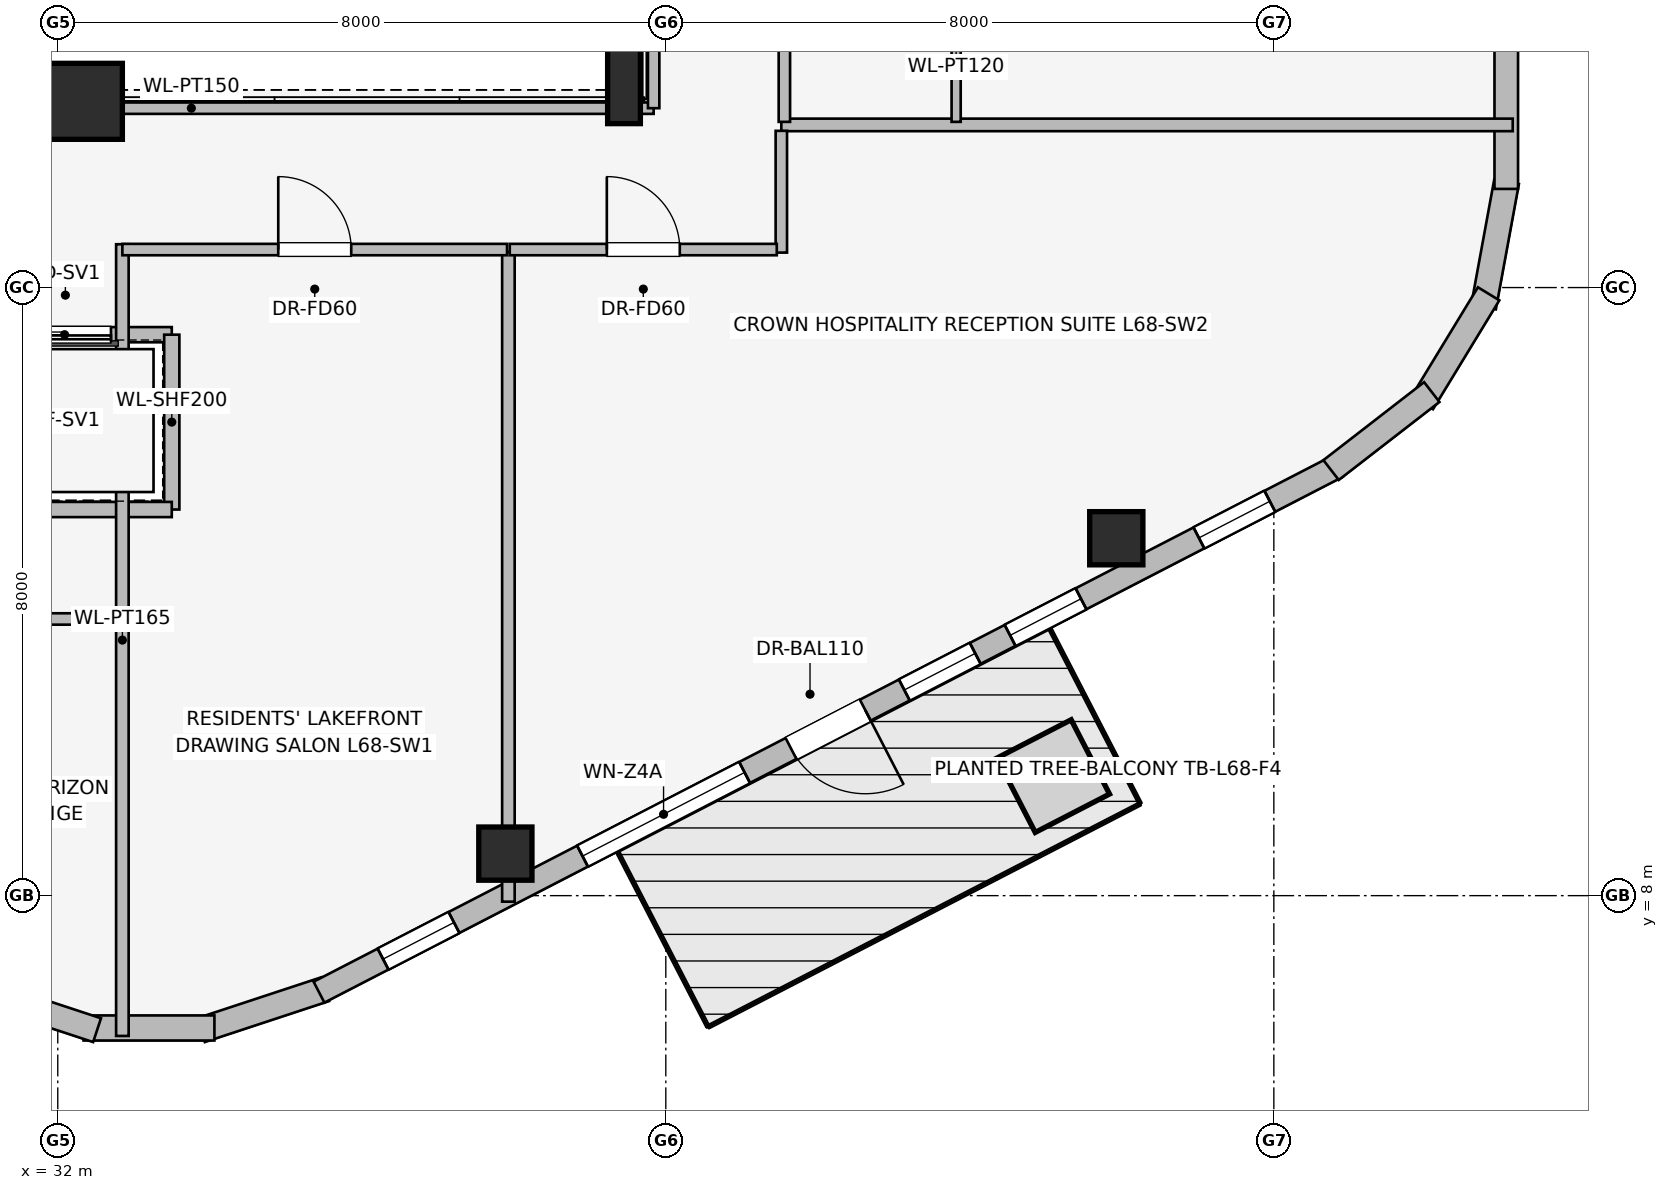
"""IFC4 building model, lengths in metres.
Left out: names, types, materials, properties, quantities, classifications, styles, units other than length and angle.
Written with IfcOpenShell. Run it as: python <this file> out.ifc"""

import sys

from ifc_helpers import new_model, si_unit, direction, frame, frame_2d, origin, origin_2d, place, context, subcontext, project, spatial, rectangle, i_section, extrude, element, fill, save


model = new_model("IFC4")
c1 = context("Model", 3, precision=1e-05, world=origin(), true_north=direction((0.0, 1.0)))
c2 = subcontext(c1, "Body", "Model", "MODEL_VIEW")
j1 = project(units=[si_unit("LENGTHUNIT", "METRE"), si_unit("PLANEANGLEUNIT", "RADIAN")], contexts=[c1])
p1 = place(None, origin())
s1 = spatial("IfcSite", under=j1, at=p1, CompositionType="ELEMENT")
p2 = place(p1, origin())
s2 = spatial("IfcBuilding", under=s1, at=p2, CompositionType="ELEMENT")
p3 = place(p2, frame((0.0, 0.0, 249.0)))
s3 = spatial("IfcBuildingStorey", under=s2, at=p3, CompositionType="ELEMENT", Elevation=249.0)
p4 = place(p3, frame((32.35, 18.45, 0.0), z_axis=(0.0, 0.0, 1.0), x_axis=(1.0, 0.0, 0.0)))
e1 = element("IfcColumn", 1, at=p4, inside=s3, PredefinedType="COLUMN", context=c2, shape_type="SweptSolid", body=[
    extrude(rectangle(XDim=1.0, YDim=1.0, at=origin_2d()), origin(), (0.0, 0.0, 1.0), 3.55),
])
for number, where, z_axis, x_axis in (
    (2, (37.889, 8.553, 0.0), (0.0, 0.0, 1.0), (1.0, 0.0, 0.0)),
    (3, (45.927, 12.702, 0.0), (0.0, 0.0, 1.0), (1.0, 0.0, 0.0)),
):
    element("IfcColumn", number, at=place(p3, frame(where, z_axis=z_axis, x_axis=x_axis)), inside=s3, PredefinedType="COLUMN", context=c2, shape_type="SweptSolid", body=[
        extrude(rectangle(XDim=0.7, YDim=0.7, at=origin_2d()), origin(), (0.0, 0.0, 1.0), 3.55),
    ])
p5 = place(p3, frame((39.45, 18.65, 0.0), z_axis=(0.0, 0.0, 1.0), x_axis=(1.0, 0.0, 0.0)))
e4 = element("IfcColumn", 4, at=p5, inside=s3, PredefinedType="COLUMN", context=c2, shape_type="SweptSolid", body=[
    extrude(i_section(OverallWidth=0.431, OverallDepth=0.987, WebThickness=0.034, FlangeThickness=0.062, at=origin_2d()), origin(), (0.0, 0.0, 1.0), 3.55),
])
p6 = place(p3, frame((35.518, 6.769, 0.0), z_axis=(0.0, 0.0, 1.0), x_axis=(-0.949713440491, -0.313120393699, 0.0)))
e5 = element("IfcWall", 5, at=p6, inside=s3, PredefinedType="STANDARD", context=c2, shape_type="SweptSolid", body=[
    extrude(rectangle(XDim=1.722, YDim=0.33, at=frame_2d((0.861, 0.0))), origin(), (0.0, 0.0, 1.0), 3.29),
])
p7 = place(p3, frame((34.061, 6.259, 0.0), z_axis=(0.0, 0.0, 1.0), x_axis=(-1.0, 0.0, 0.0)))
e6 = element("IfcWall", 6, at=p7, inside=s3, PredefinedType="STANDARD", context=c2, shape_type="SweptSolid", body=[
    extrude(rectangle(XDim=1.722, YDim=0.33, at=frame_2d((0.861, 0.0))), origin(), (0.0, 0.0, 1.0), 3.29),
])
p8 = place(p3, frame((32.517, 6.23, 0.0), z_axis=(0.0, 0.0, 1.0), x_axis=(-0.949713440491, 0.313120393699, 0.0)))
e7 = element("IfcWall", 7, at=p8, inside=s3, PredefinedType="STANDARD", context=c2, shape_type="SweptSolid", body=[
    extrude(rectangle(XDim=1.722, YDim=0.33, at=frame_2d((0.861, 0.0))), origin(), (0.0, 0.0, 1.0), 3.29),
])
p9 = place(p3, frame((48.834, 13.646, 0.0), z_axis=(0.0, 0.0, 1.0), x_axis=(-0.888581481622, -0.458718814218, 0.0)))
e8 = element("IfcWall", 8, at=p9, inside=s3, PredefinedType="STANDARD", context=c2, shape_type="SweptSolid", body=[
    extrude(rectangle(XDim=15.077, YDim=0.31, at=frame_2d((7.539, 0.0))), origin(), (0.0, 0.0, 1.0), 3.29),
])
p10 = place(p9, frame((6.988, 0.0, 0.0)))
e9 = element("IfcOpeningElement", 9, at=p10, cuts=e8, PredefinedType="OPENING", context=c2, shape_type="SweptSolid", body=[
    extrude(rectangle(XDim=1.1, YDim=2.04, at=frame_2d((0.55, 1.02))), frame((0.0, 0.165, 0.0), z_axis=(0.0, -1.0, 0.0), x_axis=(1.0, 0.0, 0.0)), (0.0, 0.0, 1.0), 0.33),
])
p11 = place(p9, frame((0.998, 0.0, 0.75)))
e10 = element("IfcOpeningElement", 10, at=p11, cuts=e8, PredefinedType="OPENING", context=c2, shape_type="SweptSolid", body=[
    extrude(rectangle(XDim=1.05, YDim=1.4, at=frame_2d((0.525, 0.7))), frame((0.0, 0.165, 0.0), z_axis=(0.0, -1.0, 0.0), x_axis=(1.0, 0.0, 0.0)), (0.0, 0.0, 1.0), 0.33),
])
p12 = place(p9, frame((3.794, 0.0, 0.75)))
e11 = element("IfcOpeningElement", 11, at=p12, cuts=e8, PredefinedType="OPENING", context=c2, shape_type="SweptSolid", body=[
    extrude(rectangle(XDim=1.05, YDim=1.4, at=frame_2d((0.525, 0.7))), frame((0.0, 0.165, 0.0), z_axis=(0.0, -1.0, 0.0), x_axis=(1.0, 0.0, 0.0)), (0.0, 0.0, 1.0), 0.33),
])
p13 = place(p9, frame((5.36, 0.0, 0.75)))
e12 = element("IfcOpeningElement", 12, at=p13, cuts=e8, PredefinedType="OPENING", context=c2, shape_type="SweptSolid", body=[
    extrude(rectangle(XDim=1.05, YDim=1.4, at=frame_2d((0.525, 0.7))), frame((0.0, 0.165, 0.0), z_axis=(0.0, -1.0, 0.0), x_axis=(1.0, 0.0, 0.0)), (0.0, 0.0, 1.0), 0.33),
])
p14 = place(p9, frame((8.775, 0.0, 0.75)))
e13 = element("IfcOpeningElement", 13, at=p14, cuts=e8, PredefinedType="OPENING", context=c2, shape_type="SweptSolid", body=[
    extrude(rectangle(XDim=2.4, YDim=1.6, at=frame_2d((1.2, 0.8))), frame((0.0, 0.165, 0.0), z_axis=(0.0, -1.0, 0.0), x_axis=(1.0, 0.0, 0.0)), (0.0, 0.0, 1.0), 0.33),
])
p15 = place(p9, frame((13.078, 0.0, 0.75)))
e14 = element("IfcOpeningElement", 14, at=p15, cuts=e8, PredefinedType="OPENING", context=c2, shape_type="SweptSolid", body=[
    extrude(rectangle(XDim=1.05, YDim=1.4, at=frame_2d((0.525, 0.7))), frame((0.0, 0.165, 0.0), z_axis=(0.0, -1.0, 0.0), x_axis=(1.0, 0.0, 0.0)), (0.0, 0.0, 1.0), 0.33),
])
p16 = place(p3, frame((51.062, 17.392, 0.0), z_axis=(0.0, 0.0, 1.0), x_axis=(-0.180691763044, -0.983539773862, 0.0)))
e15 = element("IfcWall", 15, at=p16, inside=s3, PredefinedType="STANDARD", context=c2, shape_type="SweptSolid", body=[
    extrude(rectangle(XDim=1.677, YDim=0.33, at=frame_2d((0.838, 0.0))), origin(), (0.0, 0.0, 1.0), 3.29),
])
p17 = place(p3, frame((50.826, 15.918, 0.0), z_axis=(0.0, 0.0, 1.0), x_axis=(-0.520325409202, -0.853968072318, 0.0)))
e16 = element("IfcWall", 16, at=p17, inside=s3, PredefinedType="STANDARD", context=c2, shape_type="SweptSolid", body=[
    extrude(rectangle(XDim=1.678, YDim=0.33, at=frame_2d((0.839, 0.0))), origin(), (0.0, 0.0, 1.0), 3.29),
])
p18 = place(p3, frame((50.078, 14.625, 0.0), z_axis=(0.0, 0.0, 1.0), x_axis=(-0.790691856293, -0.61221433207, 0.0)))
e17 = element("IfcWall", 17, at=p18, inside=s3, PredefinedType="STANDARD", context=c2, shape_type="SweptSolid", body=[
    extrude(rectangle(XDim=1.676, YDim=0.33, at=frame_2d((0.838, 0.0))), origin(), (0.0, 0.0, 1.0), 3.29),
])
p19 = place(p3, frame((51.058, 30.702, 0.0), z_axis=(0.0, 0.0, 1.0), x_axis=(0.0, -1.0, 0.0)))
e18 = element("IfcWall", 18, at=p19, inside=s3, PredefinedType="STANDARD", context=c2, shape_type="SweptSolid", body=[
    extrude(rectangle(XDim=13.404, YDim=0.31, at=frame_2d((6.702, 0.0))), origin(), (0.0, 0.0, 1.0), 3.29),
])
p20 = place(p19, frame((3.687, 0.0, 0.75)))
e19 = element("IfcOpeningElement", 19, at=p20, cuts=e18, PredefinedType="OPENING", context=c2, shape_type="SweptSolid", body=[
    extrude(rectangle(XDim=2.4, YDim=1.6, at=frame_2d((1.2, 0.8))), frame((0.0, 0.165, 0.0), z_axis=(0.0, -1.0, 0.0), x_axis=(1.0, 0.0, 0.0)), (0.0, 0.0, 1.0), 0.33),
])
p21 = place(p19, frame((8.225, 0.0, 0.75)))
e20 = element("IfcOpeningElement", 20, at=p21, cuts=e18, PredefinedType="OPENING", context=c2, shape_type="SweptSolid", body=[
    extrude(rectangle(XDim=1.05, YDim=1.4, at=frame_2d((0.525, 0.7))), frame((0.0, 0.165, 0.0), z_axis=(0.0, -1.0, 0.0), x_axis=(1.0, 0.0, 0.0)), (0.0, 0.0, 1.0), 0.33),
])
p22 = place(p3, frame((33.5, 15.38, 0.0), z_axis=(0.0, 0.0, 1.0), x_axis=(-1.0, 0.0, 0.0)))
e21 = element("IfcWall", 21, at=p22, inside=s3, PredefinedType="PARTITIONING", context=c2, shape_type="SweptSolid", body=[
    extrude(rectangle(XDim=2.82, YDim=0.2, at=frame_2d((1.41, 0.0))), origin(), (0.0, 0.0, 1.0), 3.29),
])
p23 = place(p22, frame((0.8, 0.0, 0.0)))
e22 = element("IfcOpeningElement", 22, at=p23, cuts=e21, PredefinedType="OPENING", context=c2, shape_type="SweptSolid", body=[
    extrude(rectangle(XDim=1.2, YDim=2.2, at=frame_2d((0.6, 1.1))), frame((0.0, 0.11, 0.0), z_axis=(0.0, -1.0, 0.0), x_axis=(1.0, 0.0, 0.0)), (0.0, 0.0, 1.0), 0.22),
])
p24 = place(p3, frame((33.5, 13.08, 0.0), z_axis=(0.0, 0.0, 1.0), x_axis=(0.0, 1.0, 0.0)))
e23 = element("IfcWall", 23, at=p24, inside=s3, PredefinedType="PARTITIONING", context=c2, shape_type="SweptSolid", body=[
    extrude(rectangle(XDim=2.3, YDim=0.2, at=frame_2d((1.15, 0.0))), origin(), (0.0, 0.0, 1.0), 3.29),
])
p25 = place(p3, frame((30.879, 13.08, 0.0), z_axis=(0.0, 0.0, 1.0), x_axis=(1.0, 0.0, 0.0)))
e24 = element("IfcWall", 24, at=p25, inside=s3, PredefinedType="PARTITIONING", context=c2, shape_type="SweptSolid", body=[
    extrude(rectangle(XDim=2.621, YDim=0.2, at=frame_2d((1.311, 0.0))), origin(), (0.0, 0.0, 1.0), 3.29),
])
p26 = place(p3, frame((27.675, 18.36, 0.0), z_axis=(0.0, 0.0, 1.0), x_axis=(1.0, 0.0, 0.0)))
e25 = element("IfcWall", 25, at=p26, inside=s3, PredefinedType="PARTITIONING", context=c2, shape_type="SweptSolid", body=[
    extrude(rectangle(XDim=12.165, YDim=0.15, at=frame_2d((6.083, 0.0))), origin(), (0.0, 0.0, 1.0), 2.431),
])
p27 = place(p3, frame((39.84, 18.36, 0.0), z_axis=(0.0, 0.0, 1.0), x_axis=(0.0, 1.0, 0.0)))
e26 = element("IfcWall", 26, at=p27, inside=s3, PredefinedType="PARTITIONING", context=c2, shape_type="SweptSolid", body=[
    extrude(rectangle(XDim=11.28, YDim=0.15, at=frame_2d((5.64, 0.0))), origin(), (0.0, 0.0, 1.0), 3.29),
])
p28 = place(p3, frame((32.85, 6.154, 0.0), z_axis=(0.0, 0.0, 1.0), x_axis=(0.0, 1.0, 0.0)))
e27 = element("IfcWall", 27, at=p28, inside=s3, PredefinedType="PARTITIONING", context=c2, shape_type="SweptSolid", body=[
    extrude(rectangle(XDim=10.416, YDim=0.165, at=frame_2d((5.208, 0.0))), origin(), (0.0, 0.0, 1.0), 3.29),
])
p29 = place(p3, frame((21.244, 11.64, 0.0), z_axis=(0.0, 0.0, 1.0), x_axis=(1.0, 0.0, 0.0)))
e28 = element("IfcWall", 28, at=p29, inside=s3, PredefinedType="PARTITIONING", context=c2, shape_type="SweptSolid", body=[
    extrude(rectangle(XDim=11.606, YDim=0.15, at=frame_2d((5.803, 0.0))), origin(), (0.0, 0.0, 1.0), 2.833),
])
p30 = place(p29, frame((4.856, 0.0, 0.0)))
e29 = element("IfcOpeningElement", 29, at=p30, cuts=e28, PredefinedType="OPENING", context=c2, shape_type="SweptSolid", body=[
    extrude(rectangle(XDim=0.9, YDim=2.0, at=frame_2d((0.45, 1.0))), frame((0.0, 0.085, 0.0), z_axis=(0.0, -1.0, 0.0), x_axis=(1.0, 0.0, 0.0)), (0.0, 0.0, 1.0), 0.17),
])
p31 = place(p29, frame((8.306, 0.0, 0.0)))
e30 = element("IfcOpeningElement", 30, at=p31, cuts=e28, PredefinedType="OPENING", context=c2, shape_type="SweptSolid", body=[
    extrude(rectangle(XDim=0.9, YDim=2.0, at=frame_2d((0.45, 1.0))), frame((0.0, 0.085, 0.0), z_axis=(0.0, -1.0, 0.0), x_axis=(1.0, 0.0, 0.0)), (0.0, 0.0, 1.0), 0.17),
])
p32 = place(p3, frame((41.52, 18.14, 0.0), z_axis=(0.0, 0.0, 1.0), x_axis=(1.0, 0.0, 0.0)))
e31 = element("IfcWall", 31, at=p32, inside=s3, PredefinedType="PARTITIONING", context=c2, shape_type="SweptSolid", body=[
    extrude(rectangle(XDim=9.623, YDim=0.165, at=frame_2d((4.812, 0.0))), origin(), (0.0, 0.0, 1.0), 3.29),
])
p33 = place(p3, frame((43.82, 18.18, 0.0), z_axis=(0.0, 0.0, 1.0), x_axis=(0.0, 1.0, 0.0)))
e32 = element("IfcWall", 32, at=p33, inside=s3, PredefinedType="PARTITIONING", context=c2, shape_type="SweptSolid", body=[
    extrude(rectangle(XDim=2.28, YDim=0.12, at=frame_2d((1.14, 0.0))), origin(), (0.0, 0.0, 1.0), 2.887),
])
p34 = place(p3, frame((41.56, 18.18, 0.0), z_axis=(0.0, 0.0, 1.0), x_axis=(0.0, 1.0, 0.0)))
e33 = element("IfcWall", 33, at=p34, inside=s3, PredefinedType="PARTITIONING", context=c2, shape_type="SweptSolid", body=[
    extrude(rectangle(XDim=5.569, YDim=0.15, at=frame_2d((2.785, 0.0))), origin(), (0.0, 0.0, 1.0), 3.29),
])
p35 = place(p34, frame((3.405, 0.0, 0.0)))
e34 = element("IfcOpeningElement", 34, at=p35, cuts=e33, PredefinedType="OPENING", context=c2, shape_type="SweptSolid", body=[
    extrude(rectangle(XDim=0.96, YDim=2.0, at=frame_2d((0.48, 1.0))), frame((0.0, 0.085, 0.0), z_axis=(0.0, -1.0, 0.0), x_axis=(1.0, 0.0, 0.0)), (0.0, 0.0, 1.0), 0.17),
])
p36 = place(p3, frame((41.52, 16.46, 0.0), z_axis=(0.0, 0.0, 1.0), x_axis=(0.0, 1.0, 0.0)))
e35 = element("IfcWall", 35, at=p36, inside=s3, PredefinedType="PARTITIONING", context=c2, shape_type="SweptSolid", body=[
    extrude(rectangle(XDim=1.602, YDim=0.15, at=frame_2d((0.801, 0.0))), origin(), (0.0, 0.0, 1.0), 3.29),
])
p37 = place(p3, frame((37.929, 7.921, 0.0), z_axis=(0.0, 0.0, 1.0), x_axis=(0.0, 1.0, 0.0)))
e36 = element("IfcWall", 36, at=p37, inside=s3, PredefinedType="PARTITIONING", context=c2, shape_type="SweptSolid", body=[
    extrude(rectangle(XDim=8.549, YDim=0.165, at=frame_2d((4.274, 0.0))), origin(), (0.0, 0.0, 1.0), 2.679),
])
p38 = place(p3, frame((32.85, 16.5, 0.0), z_axis=(0.0, 0.0, 1.0), x_axis=(1.0, 0.0, 0.0)))
e37 = element("IfcWall", 37, at=p38, inside=s3, PredefinedType="PARTITIONING", context=c2, shape_type="SweptSolid", body=[
    extrude(rectangle(XDim=5.061, YDim=0.15, at=frame_2d((2.53, 0.0))), origin(), (0.0, 0.0, 1.0), 3.29),
])
p39 = place(p38, frame((2.051, 0.0, 0.0)))
e38 = element("IfcOpeningElement", 38, at=p39, cuts=e37, PredefinedType="OPENING", context=c2, shape_type="SweptSolid", body=[
    extrude(rectangle(XDim=0.96, YDim=2.0, at=frame_2d((0.48, 1.0))), frame((0.0, 0.085, 0.0), z_axis=(0.0, -1.0, 0.0), x_axis=(1.0, 0.0, 0.0)), (0.0, 0.0, 1.0), 0.17),
])
p40 = place(p3, frame((37.947, 16.5, 0.0), z_axis=(0.0, 0.0, 1.0), x_axis=(1.0, 0.0, 0.0)))
e39 = element("IfcWall", 39, at=p40, inside=s3, PredefinedType="PARTITIONING", context=c2, shape_type="SweptSolid", body=[
    extrude(rectangle(XDim=3.513, YDim=0.15, at=frame_2d((1.756, 0.0))), origin(), (0.0, 0.0, 1.0), 3.29),
])
p41 = place(p40, frame((1.277, 0.0, 0.0)))
e40 = element("IfcOpeningElement", 40, at=p41, cuts=e39, PredefinedType="OPENING", context=c2, shape_type="SweptSolid", body=[
    extrude(rectangle(XDim=0.96, YDim=2.0, at=frame_2d((0.48, 1.0))), frame((0.0, 0.085, 0.0), z_axis=(0.0, -1.0, 0.0), x_axis=(1.0, 0.0, 0.0)), (0.0, 0.0, 1.0), 0.17),
])
p42 = place(p10, origin())
e41 = element("IfcDoor", 41, at=p42, inside=s3, OperationType="SINGLE_SWING_LEFT", PredefinedType="DOOR", context=c2, shape_type="SweptSolid", body=[
    extrude(rectangle(XDim=1.1, YDim=2.04, at=frame_2d((0.55, 1.02))), frame((0.0, 0.025, 0.0), z_axis=(0.0, -1.0, 0.0), x_axis=(1.0, 0.0, 0.0)), (0.0, 0.0, 1.0), 0.05),
])
fill(e9, e41)
p43 = place(p11, origin())
e42 = element("IfcWindow", 42, at=p43, inside=s3, PartitioningType="SINGLE_PANEL", PredefinedType="WINDOW", context=c2, shape_type="SweptSolid", body=[
    extrude(rectangle(XDim=1.05, YDim=1.4, at=frame_2d((0.525, 0.7))), frame((0.0, 0.03, 0.0), z_axis=(0.0, -1.0, 0.0), x_axis=(1.0, 0.0, 0.0)), (0.0, 0.0, 1.0), 0.06),
])
fill(e10, e42)
p44 = place(p12, origin())
e43 = element("IfcWindow", 43, at=p44, inside=s3, PartitioningType="SINGLE_PANEL", PredefinedType="WINDOW", context=c2, shape_type="SweptSolid", body=[
    extrude(rectangle(XDim=1.05, YDim=1.4, at=frame_2d((0.525, 0.7))), frame((0.0, 0.03, 0.0), z_axis=(0.0, -1.0, 0.0), x_axis=(1.0, 0.0, 0.0)), (0.0, 0.0, 1.0), 0.06),
])
fill(e11, e43)
p45 = place(p13, origin())
e44 = element("IfcWindow", 44, at=p45, inside=s3, PartitioningType="SINGLE_PANEL", PredefinedType="WINDOW", context=c2, shape_type="SweptSolid", body=[
    extrude(rectangle(XDim=1.05, YDim=1.4, at=frame_2d((0.525, 0.7))), frame((0.0, 0.03, 0.0), z_axis=(0.0, -1.0, 0.0), x_axis=(1.0, 0.0, 0.0)), (0.0, 0.0, 1.0), 0.06),
])
fill(e12, e44)
p46 = place(p14, origin())
e45 = element("IfcWindow", 45, at=p46, inside=s3, PartitioningType="SINGLE_PANEL", PredefinedType="WINDOW", context=c2, shape_type="SweptSolid", body=[
    extrude(rectangle(XDim=2.4, YDim=1.6, at=frame_2d((1.2, 0.8))), frame((0.0, 0.03, 0.0), z_axis=(0.0, -1.0, 0.0), x_axis=(1.0, 0.0, 0.0)), (0.0, 0.0, 1.0), 0.06),
])
fill(e13, e45)
p47 = place(p15, origin())
e46 = element("IfcWindow", 46, at=p47, inside=s3, PartitioningType="SINGLE_PANEL", PredefinedType="WINDOW", context=c2, shape_type="SweptSolid", body=[
    extrude(rectangle(XDim=1.05, YDim=1.4, at=frame_2d((0.525, 0.7))), frame((0.0, 0.03, 0.0), z_axis=(0.0, -1.0, 0.0), x_axis=(1.0, 0.0, 0.0)), (0.0, 0.0, 1.0), 0.06),
])
fill(e14, e46)
p48 = place(p23, origin())
e47 = element("IfcDoor", 47, at=p48, inside=s3, OperationType="SLIDING_TO_RIGHT", PredefinedType="DOOR", context=c2, shape_type="SweptSolid", body=[
    extrude(rectangle(XDim=1.2, YDim=2.2, at=frame_2d((0.6, 1.1))), frame((0.0, 0.025, 0.0), z_axis=(0.0, -1.0, 0.0), x_axis=(1.0, 0.0, 0.0)), (0.0, 0.0, 1.0), 0.05),
])
fill(e22, e47)
p49 = place(p39, origin())
e48 = element("IfcDoor", 48, at=p49, inside=s3, OperationType="SINGLE_SWING_LEFT", PredefinedType="DOOR", context=c2, shape_type="SweptSolid", body=[
    extrude(rectangle(XDim=0.96, YDim=2.0, at=frame_2d((0.48, 1.0))), frame((0.0, 0.025, 0.0), z_axis=(0.0, -1.0, 0.0), x_axis=(1.0, 0.0, 0.0)), (0.0, 0.0, 1.0), 0.05),
])
fill(e38, e48)
p50 = place(p41, origin())
e49 = element("IfcDoor", 49, at=p50, inside=s3, OperationType="SINGLE_SWING_LEFT", PredefinedType="DOOR", context=c2, shape_type="SweptSolid", body=[
    extrude(rectangle(XDim=0.96, YDim=2.0, at=frame_2d((0.48, 1.0))), frame((0.0, 0.025, 0.0), z_axis=(0.0, -1.0, 0.0), x_axis=(1.0, 0.0, 0.0)), (0.0, 0.0, 1.0), 0.05),
])
fill(e40, e49)
save(model, sys.argv[1])
